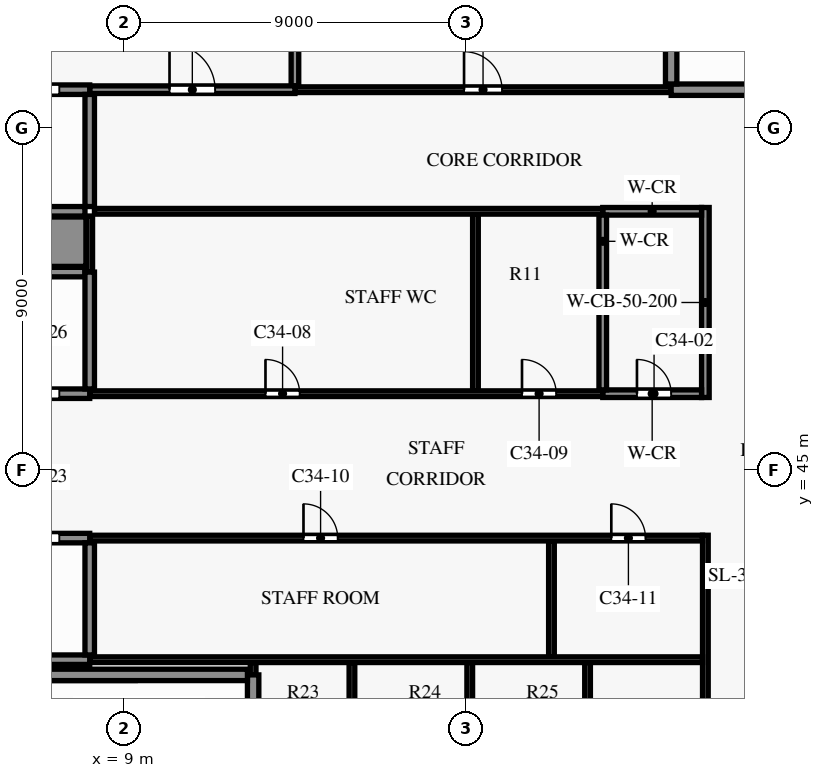
"""IFC4 building model, lengths in metres.
Left out: names, types, materials, properties, quantities, classifications, styles, units other than length and angle.
Written with IfcOpenShell. Run it as: python <this file> out.ifc"""

import sys

from ifc_helpers import new_model, si_unit, direction, frame, frame_2d, origin, place, context, subcontext, project, spatial, rectangle, extrude, element, fill, save


model = new_model("IFC4")
c1 = context("Model", 3, precision=1e-05, world=origin(), true_north=direction((0.0, 1.0)))
c2 = subcontext(c1, "Body", "Model", "MODEL_VIEW")
j1 = project(units=[si_unit("LENGTHUNIT", "METRE"), si_unit("PLANEANGLEUNIT", "RADIAN")], contexts=[c1])
p1 = place(None, origin())
s1 = spatial("IfcSite", under=j1, at=p1, CompositionType="ELEMENT")
p2 = place(p1, origin())
s2 = spatial("IfcBuilding", under=s1, at=p2, CompositionType="ELEMENT")
p3 = place(p2, frame((0.0, 0.0, 252.4)))
s3 = spatial("IfcBuildingStorey", under=s2, at=p3, CompositionType="ELEMENT", Elevation=252.4)
p4 = place(p3, frame((4.55, 39.6, 0.0), z_axis=(0.0, 0.0, 1.0), x_axis=(1.0, 0.0, 0.0)))
e1 = element("IfcWall", 1, at=p4, inside=s3, PredefinedType="SHEAR", context=c2, shape_type="SweptSolid", body=[
    extrude(rectangle(XDim=7.7, YDim=0.3, at=frame_2d((3.85, 0.0))), origin(), (0.0, 0.0, 1.0), 3.5),
])
p5 = place(p3, frame((8.1, 40.0, 0.0), z_axis=(0.0, 0.0, 1.0), x_axis=(1.0, 0.0, 0.0)))
e2 = element("IfcWall", 2, at=p5, inside=s3, PredefinedType="PARTITIONING", context=c2, shape_type="SweptSolid", body=[
    extrude(rectangle(XDim=16.125, YDim=0.15, at=frame_2d((8.062, 0.0))), origin(), (0.0, 0.0, 1.0), 3.5),
])
p6 = place(p3, frame((0.15, 40.0, 0.0), z_axis=(0.0, 0.0, 1.0), x_axis=(1.0, 0.0, 0.0)))
e3 = element("IfcWall", 3, at=p6, inside=s3, PredefinedType="SHEAR", context=c2, shape_type="SweptSolid", body=[
    extrude(rectangle(XDim=7.95, YDim=0.25, at=frame_2d((3.975, 0.0))), origin(), (0.0, 0.0, 1.0), 3.5),
])
p7 = place(p3, frame((8.1, 43.2, 0.0), z_axis=(0.0, 0.0, 1.0), x_axis=(1.0, 0.0, 0.0)))
e4 = element("IfcWall", 4, at=p7, inside=s3, PredefinedType="PARTITIONING", context=c2, shape_type="SweptSolid", body=[
    extrude(rectangle(XDim=16.125, YDim=0.15, at=frame_2d((8.062, 0.0))), origin(), (0.0, 0.0, 1.0), 3.5),
])
p8 = place(p7, frame((5.625, 0.0, 0.0)))
e5 = element("IfcOpeningElement", 5, at=p8, cuts=e4, PredefinedType="OPENING", context=c2, shape_type="SweptSolid", body=[
    extrude(rectangle(XDim=0.9, YDim=2.1, at=frame_2d((0.45, 1.05))), frame((0.0, 0.085, 0.0), z_axis=(0.0, -1.0, 0.0), x_axis=(1.0, 0.0, 0.0)), (0.0, 0.0, 1.0), 0.17),
])
p9 = place(p7, frame((13.725, 0.0, 0.0)))
e6 = element("IfcOpeningElement", 6, at=p9, cuts=e4, PredefinedType="OPENING", context=c2, shape_type="SweptSolid", body=[
    extrude(rectangle(XDim=0.9, YDim=2.1, at=frame_2d((0.45, 1.05))), frame((0.0, 0.085, 0.0), z_axis=(0.0, -1.0, 0.0), x_axis=(1.0, 0.0, 0.0)), (0.0, 0.0, 1.0), 0.17),
])
p10 = place(p3, frame((0.125, 43.2, 0.0), z_axis=(0.0, 0.0, 1.0), x_axis=(1.0, 0.0, 0.0)))
e7 = element("IfcWall", 7, at=p10, inside=s3, PredefinedType="SHEAR", context=c2, shape_type="SweptSolid", body=[
    extrude(rectangle(XDim=7.975, YDim=0.25, at=frame_2d((3.988, 0.0))), origin(), (0.0, 0.0, 1.0), 3.5),
])
p11 = place(p10, frame((0.675, 0.0, 0.0)))
e8 = element("IfcOpeningElement", 8, at=p11, cuts=e7, PredefinedType="OPENING", context=c2, shape_type="SweptSolid", body=[
    extrude(rectangle(XDim=1.1, YDim=2.1, at=frame_2d((0.55, 1.05))), frame((0.0, 0.135, 0.0), z_axis=(0.0, -1.0, 0.0), x_axis=(1.0, 0.0, 0.0)), (0.0, 0.0, 1.0), 0.27),
])
p12 = place(p10, frame((3.375, 0.0, 0.0)))
e9 = element("IfcOpeningElement", 9, at=p12, cuts=e7, PredefinedType="OPENING", context=c2, shape_type="SweptSolid", body=[
    extrude(rectangle(XDim=1.1, YDim=2.1, at=frame_2d((0.55, 1.05))), frame((0.0, 0.135, 0.0), z_axis=(0.0, -1.0, 0.0), x_axis=(1.0, 0.0, 0.0)), (0.0, 0.0, 1.0), 0.27),
])
p13 = place(p10, frame((6.075, 0.0, 0.0)))
e10 = element("IfcOpeningElement", 10, at=p13, cuts=e7, PredefinedType="OPENING", context=c2, shape_type="SweptSolid", body=[
    extrude(rectangle(XDim=1.1, YDim=2.1, at=frame_2d((0.55, 1.05))), frame((0.0, 0.135, 0.0), z_axis=(0.0, -1.0, 0.0), x_axis=(1.0, 0.0, 0.0)), (0.0, 0.0, 1.0), 0.27),
])
p14 = place(p3, frame((8.1, 47.0, 0.0), z_axis=(0.0, 0.0, 1.0), x_axis=(1.0, 0.0, 0.0)))
e11 = element("IfcWall", 11, at=p14, inside=s3, PredefinedType="PARTITIONING", context=c2, shape_type="SweptSolid", body=[
    extrude(rectangle(XDim=13.5, YDim=0.15, at=frame_2d((6.75, 0.0))), origin(), (0.0, 0.0, 1.0), 3.5),
])
p15 = place(p14, frame((4.625, 0.0, 0.0)))
e12 = element("IfcOpeningElement", 12, at=p15, cuts=e11, PredefinedType="OPENING", context=c2, shape_type="SweptSolid", body=[
    extrude(rectangle(XDim=0.9, YDim=2.1, at=frame_2d((0.45, 1.05))), frame((0.0, 0.085, 0.0), z_axis=(0.0, -1.0, 0.0), x_axis=(1.0, 0.0, 0.0)), (0.0, 0.0, 1.0), 0.17),
])
p16 = place(p14, frame((11.375, 0.0, 0.0)))
e13 = element("IfcOpeningElement", 13, at=p16, cuts=e11, PredefinedType="OPENING", context=c2, shape_type="SweptSolid", body=[
    extrude(rectangle(XDim=0.9, YDim=2.1, at=frame_2d((0.45, 1.05))), frame((0.0, 0.085, 0.0), z_axis=(0.0, -1.0, 0.0), x_axis=(1.0, 0.0, 0.0)), (0.0, 0.0, 1.0), 0.17),
])
p17 = place(p3, frame((21.6, 47.0, 0.0), z_axis=(0.0, 0.0, 1.0), x_axis=(1.0, 0.0, 0.0)))
e14 = element("IfcWall", 14, at=p17, inside=s3, PredefinedType="PARTITIONING", context=c2, shape_type="SweptSolid", body=[
    extrude(rectangle(XDim=2.6, YDim=0.2, at=frame_2d((1.3, 0.0))), origin(), (0.0, 0.0, 1.0), 3.5),
])
p18 = place(p17, frame((0.9, 0.0, 0.0)))
e15 = element("IfcOpeningElement", 15, at=p18, cuts=e14, PredefinedType="OPENING", context=c2, shape_type="SweptSolid", body=[
    extrude(rectangle(XDim=0.9, YDim=2.1, at=frame_2d((0.45, 1.05))), frame((0.0, 0.11, 0.0), z_axis=(0.0, -1.0, 0.0), x_axis=(1.0, 0.0, 0.0)), (0.0, 0.0, 1.0), 0.22),
])
p19 = place(p3, frame((0.125, 47.0, 0.0), z_axis=(0.0, 0.0, 1.0), x_axis=(1.0, 0.0, 0.0)))
e16 = element("IfcWall", 16, at=p19, inside=s3, PredefinedType="SHEAR", context=c2, shape_type="SweptSolid", body=[
    extrude(rectangle(XDim=7.975, YDim=0.25, at=frame_2d((3.988, 0.0))), origin(), (0.0, 0.0, 1.0), 3.5),
])
p20 = place(p19, frame((0.675, 0.0, 0.0)))
e17 = element("IfcOpeningElement", 17, at=p20, cuts=e16, PredefinedType="OPENING", context=c2, shape_type="SweptSolid", body=[
    extrude(rectangle(XDim=1.1, YDim=2.1, at=frame_2d((0.55, 1.05))), frame((0.0, 0.135, 0.0), z_axis=(0.0, -1.0, 0.0), x_axis=(1.0, 0.0, 0.0)), (0.0, 0.0, 1.0), 0.27),
])
p21 = place(p19, frame((3.375, 0.0, 0.0)))
e18 = element("IfcOpeningElement", 18, at=p21, cuts=e16, PredefinedType="OPENING", context=c2, shape_type="SweptSolid", body=[
    extrude(rectangle(XDim=1.1, YDim=2.1, at=frame_2d((0.55, 1.05))), frame((0.0, 0.135, 0.0), z_axis=(0.0, -1.0, 0.0), x_axis=(1.0, 0.0, 0.0)), (0.0, 0.0, 1.0), 0.27),
])
p22 = place(p19, frame((6.075, 0.0, 0.0)))
e19 = element("IfcOpeningElement", 19, at=p22, cuts=e16, PredefinedType="OPENING", context=c2, shape_type="SweptSolid", body=[
    extrude(rectangle(XDim=1.1, YDim=2.1, at=frame_2d((0.55, 1.05))), frame((0.0, 0.135, 0.0), z_axis=(0.0, -1.0, 0.0), x_axis=(1.0, 0.0, 0.0)), (0.0, 0.0, 1.0), 0.27),
])
p23 = place(p3, frame((0.125, 50.2, 0.0), z_axis=(0.0, 0.0, 1.0), x_axis=(1.0, 0.0, 0.0)))
e20 = element("IfcWall", 20, at=p23, inside=s3, PredefinedType="SHEAR", context=c2, shape_type="SweptSolid", body=[
    extrude(rectangle(XDim=7.85, YDim=0.25, at=frame_2d((3.925, 0.0))), origin(), (0.0, 0.0, 1.0), 3.5),
])
p24 = place(p3, frame((-0.125, 51.0, 0.0), z_axis=(0.0, 0.0, 1.0), x_axis=(1.0, 0.0, 0.0)))
e21 = element("IfcWall", 21, at=p24, inside=s3, PredefinedType="SHEAR", context=c2, shape_type="SweptSolid", body=[
    extrude(rectangle(XDim=8.125, YDim=1.3, at=frame_2d((4.062, 0.0))), origin(), (0.0, 0.0, 1.0), 3.5),
])
p25 = place(p3, frame((8.225, 51.8, 0.0), z_axis=(0.0, 0.0, 1.0), x_axis=(1.0, 0.0, 0.0)))
e22 = element("IfcWall", 22, at=p25, inside=s3, PredefinedType="PARTITIONING", context=c2, shape_type="SweptSolid", body=[
    extrude(rectangle(XDim=13.375, YDim=0.15, at=frame_2d((6.688, 0.0))), origin(), (0.0, 0.0, 1.0), 3.5),
])
p26 = place(p3, frame((21.6, 51.8, 0.0), z_axis=(0.0, 0.0, 1.0), x_axis=(1.0, 0.0, 0.0)))
e23 = element("IfcWall", 23, at=p26, inside=s3, PredefinedType="PARTITIONING", context=c2, shape_type="SweptSolid", body=[
    extrude(rectangle(XDim=2.6, YDim=0.2, at=frame_2d((1.3, 0.0))), origin(), (0.0, 0.0, 1.0), 3.5),
])
p27 = place(p3, frame((0.125, 51.8, 0.0), z_axis=(0.0, 0.0, 1.0), x_axis=(1.0, 0.0, 0.0)))
e24 = element("IfcWall", 24, at=p27, inside=s3, PredefinedType="SHEAR", context=c2, shape_type="SweptSolid", body=[
    extrude(rectangle(XDim=7.85, YDim=0.25, at=frame_2d((3.925, 0.0))), origin(), (0.0, 0.0, 1.0), 3.5),
])
p28 = place(p3, frame((8.1, 55.0, 0.0), z_axis=(0.0, 0.0, 1.0), x_axis=(1.0, 0.0, 0.0)))
e25 = element("IfcWall", 25, at=p28, inside=s3, PredefinedType="PARTITIONING", context=c2, shape_type="SweptSolid", body=[
    extrude(rectangle(XDim=5.4, YDim=0.2, at=frame_2d((2.7, 0.0))), origin(), (0.0, 0.0, 1.0), 3.5),
])
p29 = place(p28, frame((2.1, 0.0, 0.0)))
e26 = element("IfcOpeningElement", 26, at=p29, cuts=e25, PredefinedType="OPENING", context=c2, shape_type="SweptSolid", body=[
    extrude(rectangle(XDim=1.2, YDim=2.2, at=frame_2d((0.6, 1.1))), frame((0.0, 0.11, 0.0), z_axis=(0.0, -1.0, 0.0), x_axis=(1.0, 0.0, 0.0)), (0.0, 0.0, 1.0), 0.22),
])
p30 = place(p3, frame((13.5, 55.0, 0.0), z_axis=(0.0, 0.0, 1.0), x_axis=(1.0, 0.0, 0.0)))
e27 = element("IfcWall", 27, at=p30, inside=s3, PredefinedType="PARTITIONING", context=c2, shape_type="SweptSolid", body=[
    extrude(rectangle(XDim=9.9, YDim=0.15, at=frame_2d((4.95, 0.0))), origin(), (0.0, 0.0, 1.0), 3.5),
])
p31 = place(p30, frame((4.45, 0.0, 0.0)))
e28 = element("IfcOpeningElement", 28, at=p31, cuts=e27, PredefinedType="OPENING", context=c2, shape_type="SweptSolid", body=[
    extrude(rectangle(XDim=1.0, YDim=2.1, at=frame_2d((0.5, 1.05))), frame((0.0, 0.085, 0.0), z_axis=(0.0, -1.0, 0.0), x_axis=(1.0, 0.0, 0.0)), (0.0, 0.0, 1.0), 0.17),
])
p32 = place(p3, frame((0.15, 55.0, 0.0), z_axis=(0.0, 0.0, 1.0), x_axis=(1.0, 0.0, 0.0)))
e29 = element("IfcWall", 29, at=p32, inside=s3, PredefinedType="SHEAR", context=c2, shape_type="SweptSolid", body=[
    extrude(rectangle(XDim=7.95, YDim=0.25, at=frame_2d((3.975, 0.0))), origin(), (0.0, 0.0, 1.0), 3.5),
])
p33 = place(p32, frame((0.65, 0.0, 0.0)))
e30 = element("IfcOpeningElement", 30, at=p33, cuts=e29, PredefinedType="OPENING", context=c2, shape_type="SweptSolid", body=[
    extrude(rectangle(XDim=1.1, YDim=2.1, at=frame_2d((0.55, 1.05))), frame((0.0, 0.135, 0.0), z_axis=(0.0, -1.0, 0.0), x_axis=(1.0, 0.0, 0.0)), (0.0, 0.0, 1.0), 0.27),
])
p34 = place(p32, frame((3.35, 0.0, 0.0)))
e31 = element("IfcOpeningElement", 31, at=p34, cuts=e29, PredefinedType="OPENING", context=c2, shape_type="SweptSolid", body=[
    extrude(rectangle(XDim=1.1, YDim=2.1, at=frame_2d((0.55, 1.05))), frame((0.0, 0.135, 0.0), z_axis=(0.0, -1.0, 0.0), x_axis=(1.0, 0.0, 0.0)), (0.0, 0.0, 1.0), 0.27),
])
p35 = place(p32, frame((6.05, 0.0, 0.0)))
e32 = element("IfcOpeningElement", 32, at=p35, cuts=e29, PredefinedType="OPENING", context=c2, shape_type="SweptSolid", body=[
    extrude(rectangle(XDim=1.1, YDim=2.1, at=frame_2d((0.55, 1.05))), frame((0.0, 0.135, 0.0), z_axis=(0.0, -1.0, 0.0), x_axis=(1.0, 0.0, 0.0)), (0.0, 0.0, 1.0), 0.27),
])
p36 = place(p3, frame((23.4, 55.0, 0.0), z_axis=(0.0, 0.0, 1.0), x_axis=(1.0, 0.0, 0.0)))
e33 = element("IfcWall", 33, at=p36, inside=s3, PredefinedType="SHEAR", context=c2, shape_type="SweptSolid", body=[
    extrude(rectangle(XDim=3.45, YDim=0.3, at=frame_2d((1.725, 0.0))), origin(), (0.0, 0.0, 1.0), 3.5),
])
p37 = place(p3, frame((8.1, 50.2, 0.0), z_axis=(0.0, 0.0, 1.0), x_axis=(0.0, 1.0, 0.0)))
e34 = element("IfcWall", 34, at=p37, inside=s3, PredefinedType="PARTITIONING", context=c2, shape_type="SweptSolid", body=[
    extrude(rectangle(XDim=1.475, YDim=0.15, at=frame_2d((0.738, 0.0))), origin(), (0.0, 0.0, 1.0), 3.5),
])
p38 = place(p3, frame((8.1, 40.125, 0.0), z_axis=(0.0, 0.0, 1.0), x_axis=(0.0, 1.0, 0.0)))
e35 = element("IfcWall", 35, at=p38, inside=s3, PredefinedType="SHEAR", context=c2, shape_type="SweptSolid", body=[
    extrude(rectangle(XDim=2.95, YDim=0.25, at=frame_2d((1.475, 0.0))), origin(), (0.0, 0.0, 1.0), 3.5),
])
p39 = place(p3, frame((8.1, 47.125, 0.0), z_axis=(0.0, 0.0, 1.0), x_axis=(0.0, 1.0, 0.0)))
e36 = element("IfcWall", 36, at=p39, inside=s3, PredefinedType="SHEAR", context=c2, shape_type="SweptSolid", body=[
    extrude(rectangle(XDim=3.075, YDim=0.25, at=frame_2d((1.538, 0.0))), origin(), (0.0, 0.0, 1.0), 3.5),
])
p40 = place(p3, frame((8.1, 51.925, 0.0), z_axis=(0.0, 0.0, 1.0), x_axis=(0.0, 1.0, 0.0)))
e37 = element("IfcWall", 37, at=p40, inside=s3, PredefinedType="SHEAR", context=c2, shape_type="SweptSolid", body=[
    extrude(rectangle(XDim=2.95, YDim=0.25, at=frame_2d((1.475, 0.0))), origin(), (0.0, 0.0, 1.0), 3.5),
])
p41 = place(p3, frame((12.4, 39.6, 0.0), z_axis=(0.0, 0.0, 1.0), x_axis=(0.0, 1.0, 0.0)))
e38 = element("IfcWall", 38, at=p41, inside=s3, PredefinedType="PARTITIONING", context=c2, shape_type="SweptSolid", body=[
    extrude(rectangle(XDim=0.325, YDim=0.15, at=frame_2d((0.163, 0.0))), origin(), (0.0, 0.0, 1.0), 3.5),
])
p42 = place(p3, frame((12.4, 36.15, 0.0), z_axis=(0.0, 0.0, 1.0), x_axis=(0.0, 1.0, 0.0)))
e39 = element("IfcWall", 39, at=p42, inside=s3, PredefinedType="SHEAR", context=c2, shape_type="SweptSolid", body=[
    extrude(rectangle(XDim=3.45, YDim=0.3, at=frame_2d((1.725, 0.0))), origin(), (0.0, 0.0, 1.0), 3.5),
])
p43 = place(p3, frame((13.5, 55.1, 0.0), z_axis=(0.0, 0.0, 1.0), x_axis=(0.0, 1.0, 0.0)))
e40 = element("IfcWall", 40, at=p43, inside=s3, PredefinedType="PARTITIONING", context=c2, shape_type="SweptSolid", body=[
    extrude(rectangle(XDim=3.9, YDim=0.2, at=frame_2d((1.95, 0.0))), origin(), (0.0, 0.0, 1.0), 3.5),
])
for number, where, z_axis, x_axis in (
    (41, (15.0, 36.075, 0.0), (0.0, 0.0, 1.0), (0.0, 1.0, 0.0)),
    (42, (18.1, 36.075, 0.0), (0.0, 0.0, 1.0), (0.0, 1.0, 0.0)),
):
    element("IfcWall", number, at=place(p3, frame(where, z_axis=z_axis, x_axis=x_axis)), inside=s3, PredefinedType="PARTITIONING", context=c2, shape_type="SweptSolid", body=[
        extrude(rectangle(XDim=3.85, YDim=0.15, at=frame_2d((1.925, 0.0))), origin(), (0.0, 0.0, 1.0), 3.5),
    ])
p44 = place(p3, frame((18.25, 47.075, 0.0), z_axis=(0.0, 0.0, 1.0), x_axis=(0.0, 1.0, 0.0)))
e43 = element("IfcWall", 43, at=p44, inside=s3, PredefinedType="PARTITIONING", context=c2, shape_type="SweptSolid", body=[
    extrude(rectangle(XDim=4.65, YDim=0.15, at=frame_2d((2.325, 0.0))), origin(), (0.0, 0.0, 1.0), 3.5),
])
p45 = place(p3, frame((20.25, 40.075, 0.0), z_axis=(0.0, 0.0, 1.0), x_axis=(0.0, 1.0, 0.0)))
e44 = element("IfcWall", 44, at=p45, inside=s3, PredefinedType="PARTITIONING", context=c2, shape_type="SweptSolid", body=[
    extrude(rectangle(XDim=3.05, YDim=0.15, at=frame_2d((1.525, 0.0))), origin(), (0.0, 0.0, 1.0), 3.5),
])
p46 = place(p3, frame((21.2, 36.075, 0.0), z_axis=(0.0, 0.0, 1.0), x_axis=(0.0, 1.0, 0.0)))
e45 = element("IfcWall", 45, at=p46, inside=s3, PredefinedType="PARTITIONING", context=c2, shape_type="SweptSolid", body=[
    extrude(rectangle(XDim=3.85, YDim=0.15, at=frame_2d((1.925, 0.0))), origin(), (0.0, 0.0, 1.0), 3.5),
])
p47 = place(p3, frame((21.6, 47.1, 0.0), z_axis=(0.0, 0.0, 1.0), x_axis=(0.0, 1.0, 0.0)))
e46 = element("IfcWall", 46, at=p47, inside=s3, PredefinedType="PARTITIONING", context=c2, shape_type="SweptSolid", body=[
    extrude(rectangle(XDim=4.6, YDim=0.2, at=frame_2d((2.3, 0.0))), origin(), (0.0, 0.0, 1.0), 3.5),
])
p48 = place(p3, frame((23.4, 55.15, 0.0), z_axis=(0.0, 0.0, 1.0), x_axis=(0.0, 1.0, 0.0)))
e47 = element("IfcWall", 47, at=p48, inside=s3, PredefinedType="SHEAR", context=c2, shape_type="SweptSolid", body=[
    extrude(rectangle(XDim=8.0, YDim=0.3, at=frame_2d((4.0, 0.0))), origin(), (0.0, 0.0, 1.0), 3.5),
])
p49 = place(p3, frame((24.3, 35.925, 0.0), z_axis=(0.0, 0.0, 1.0), x_axis=(0.0, 1.0, 0.0)))
e48 = element("IfcWall", 48, at=p49, inside=s3, PredefinedType="PARTITIONING", context=c2, shape_type="SweptSolid", body=[
    extrude(rectangle(XDim=7.35, YDim=0.15, at=frame_2d((3.675, 0.0))), origin(), (0.0, 0.0, 1.0), 3.5),
])
p50 = place(p3, frame((24.3, 46.9, 0.0), z_axis=(0.0, 0.0, 1.0), x_axis=(0.0, 1.0, 0.0)))
e49 = element("IfcWall", 49, at=p50, inside=s3, PredefinedType="SHEAR", context=c2, shape_type="SweptSolid", body=[
    extrude(rectangle(XDim=5.0, YDim=0.2, at=frame_2d((2.5, 0.0))), origin(), (0.0, 0.0, 1.0), 3.5),
])
p51 = place(p29, origin())
e50 = element("IfcDoor", 50, at=p51, inside=s3, OperationType="SINGLE_SWING_RIGHT", PredefinedType="DOOR", context=c2, shape_type="SweptSolid", body=[
    extrude(rectangle(XDim=1.2, YDim=2.2, at=frame_2d((0.6, 1.1))), frame((0.0, 0.025, 0.0), z_axis=(0.0, -1.0, 0.0), x_axis=(1.0, 0.0, 0.0)), (0.0, 0.0, 1.0), 0.05),
])
fill(e26, e50)
p52 = place(p18, origin())
e51 = element("IfcDoor", 51, at=p52, inside=s3, OperationType="SINGLE_SWING_LEFT", PredefinedType="DOOR", context=c2, shape_type="SweptSolid", body=[
    extrude(rectangle(XDim=0.9, YDim=2.1, at=frame_2d((0.45, 1.05))), frame((0.0, 0.025, 0.0), z_axis=(0.0, -1.0, 0.0), x_axis=(1.0, 0.0, 0.0)), (0.0, 0.0, 1.0), 0.05),
])
fill(e15, e51)
p53 = place(p15, origin())
e52 = element("IfcDoor", 52, at=p53, inside=s3, OperationType="SINGLE_SWING_LEFT", PredefinedType="DOOR", context=c2, shape_type="SweptSolid", body=[
    extrude(rectangle(XDim=0.9, YDim=2.1, at=frame_2d((0.45, 1.05))), frame((0.0, 0.025, 0.0), z_axis=(0.0, -1.0, 0.0), x_axis=(1.0, 0.0, 0.0)), (0.0, 0.0, 1.0), 0.05),
])
fill(e12, e52)
p54 = place(p16, origin())
e53 = element("IfcDoor", 53, at=p54, inside=s3, OperationType="SINGLE_SWING_RIGHT", PredefinedType="DOOR", context=c2, shape_type="SweptSolid", body=[
    extrude(rectangle(XDim=0.9, YDim=2.1, at=frame_2d((0.45, 1.05))), frame((0.0, 0.025, 0.0), z_axis=(0.0, -1.0, 0.0), x_axis=(1.0, 0.0, 0.0)), (0.0, 0.0, 1.0), 0.05),
])
fill(e13, e53)
p55 = place(p8, origin())
e54 = element("IfcDoor", 54, at=p55, inside=s3, OperationType="SINGLE_SWING_RIGHT", PredefinedType="DOOR", context=c2, shape_type="SweptSolid", body=[
    extrude(rectangle(XDim=0.9, YDim=2.1, at=frame_2d((0.45, 1.05))), frame((0.0, 0.025, 0.0), z_axis=(0.0, -1.0, 0.0), x_axis=(1.0, 0.0, 0.0)), (0.0, 0.0, 1.0), 0.05),
])
fill(e5, e54)
p56 = place(p9, origin())
e55 = element("IfcDoor", 55, at=p56, inside=s3, OperationType="SINGLE_SWING_LEFT", PredefinedType="DOOR", context=c2, shape_type="SweptSolid", body=[
    extrude(rectangle(XDim=0.9, YDim=2.1, at=frame_2d((0.45, 1.05))), frame((0.0, 0.025, 0.0), z_axis=(0.0, -1.0, 0.0), x_axis=(1.0, 0.0, 0.0)), (0.0, 0.0, 1.0), 0.05),
])
fill(e6, e55)
p57 = place(p31, origin())
e56 = element("IfcDoor", 56, at=p57, inside=s3, OperationType="SINGLE_SWING_LEFT", PredefinedType="DOOR", context=c2, shape_type="SweptSolid", body=[
    extrude(rectangle(XDim=1.0, YDim=2.1, at=frame_2d((0.5, 1.05))), frame((0.0, 0.025, 0.0), z_axis=(0.0, -1.0, 0.0), x_axis=(1.0, 0.0, 0.0)), (0.0, 0.0, 1.0), 0.05),
])
fill(e28, e56)
p58 = place(p35, origin())
e57 = element("IfcDoor", 57, at=p58, inside=s3, OperationType="DOUBLE_DOOR_SLIDING", PredefinedType="DOOR", context=c2, shape_type="SweptSolid", body=[
    extrude(rectangle(XDim=1.1, YDim=2.1, at=frame_2d((0.55, 1.05))), frame((0.0, 0.025, 0.0), z_axis=(0.0, -1.0, 0.0), x_axis=(1.0, 0.0, 0.0)), (0.0, 0.0, 1.0), 0.05),
])
fill(e32, e57)
p59 = place(p13, origin())
e58 = element("IfcDoor", 58, at=p59, inside=s3, OperationType="DOUBLE_DOOR_SLIDING", PredefinedType="DOOR", context=c2, shape_type="SweptSolid", body=[
    extrude(rectangle(XDim=1.1, YDim=2.1, at=frame_2d((0.55, 1.05))), frame((0.0, 0.025, 0.0), z_axis=(0.0, -1.0, 0.0), x_axis=(1.0, 0.0, 0.0)), (0.0, 0.0, 1.0), 0.05),
])
fill(e10, e58)
p60 = place(p22, origin())
e59 = element("IfcDoor", 59, at=p60, inside=s3, OperationType="DOUBLE_DOOR_SLIDING", PredefinedType="DOOR", context=c2, shape_type="SweptSolid", body=[
    extrude(rectangle(XDim=1.1, YDim=2.1, at=frame_2d((0.55, 1.05))), frame((0.0, 0.025, 0.0), z_axis=(0.0, -1.0, 0.0), x_axis=(1.0, 0.0, 0.0)), (0.0, 0.0, 1.0), 0.05),
])
fill(e19, e59)
save(model, sys.argv[1])
